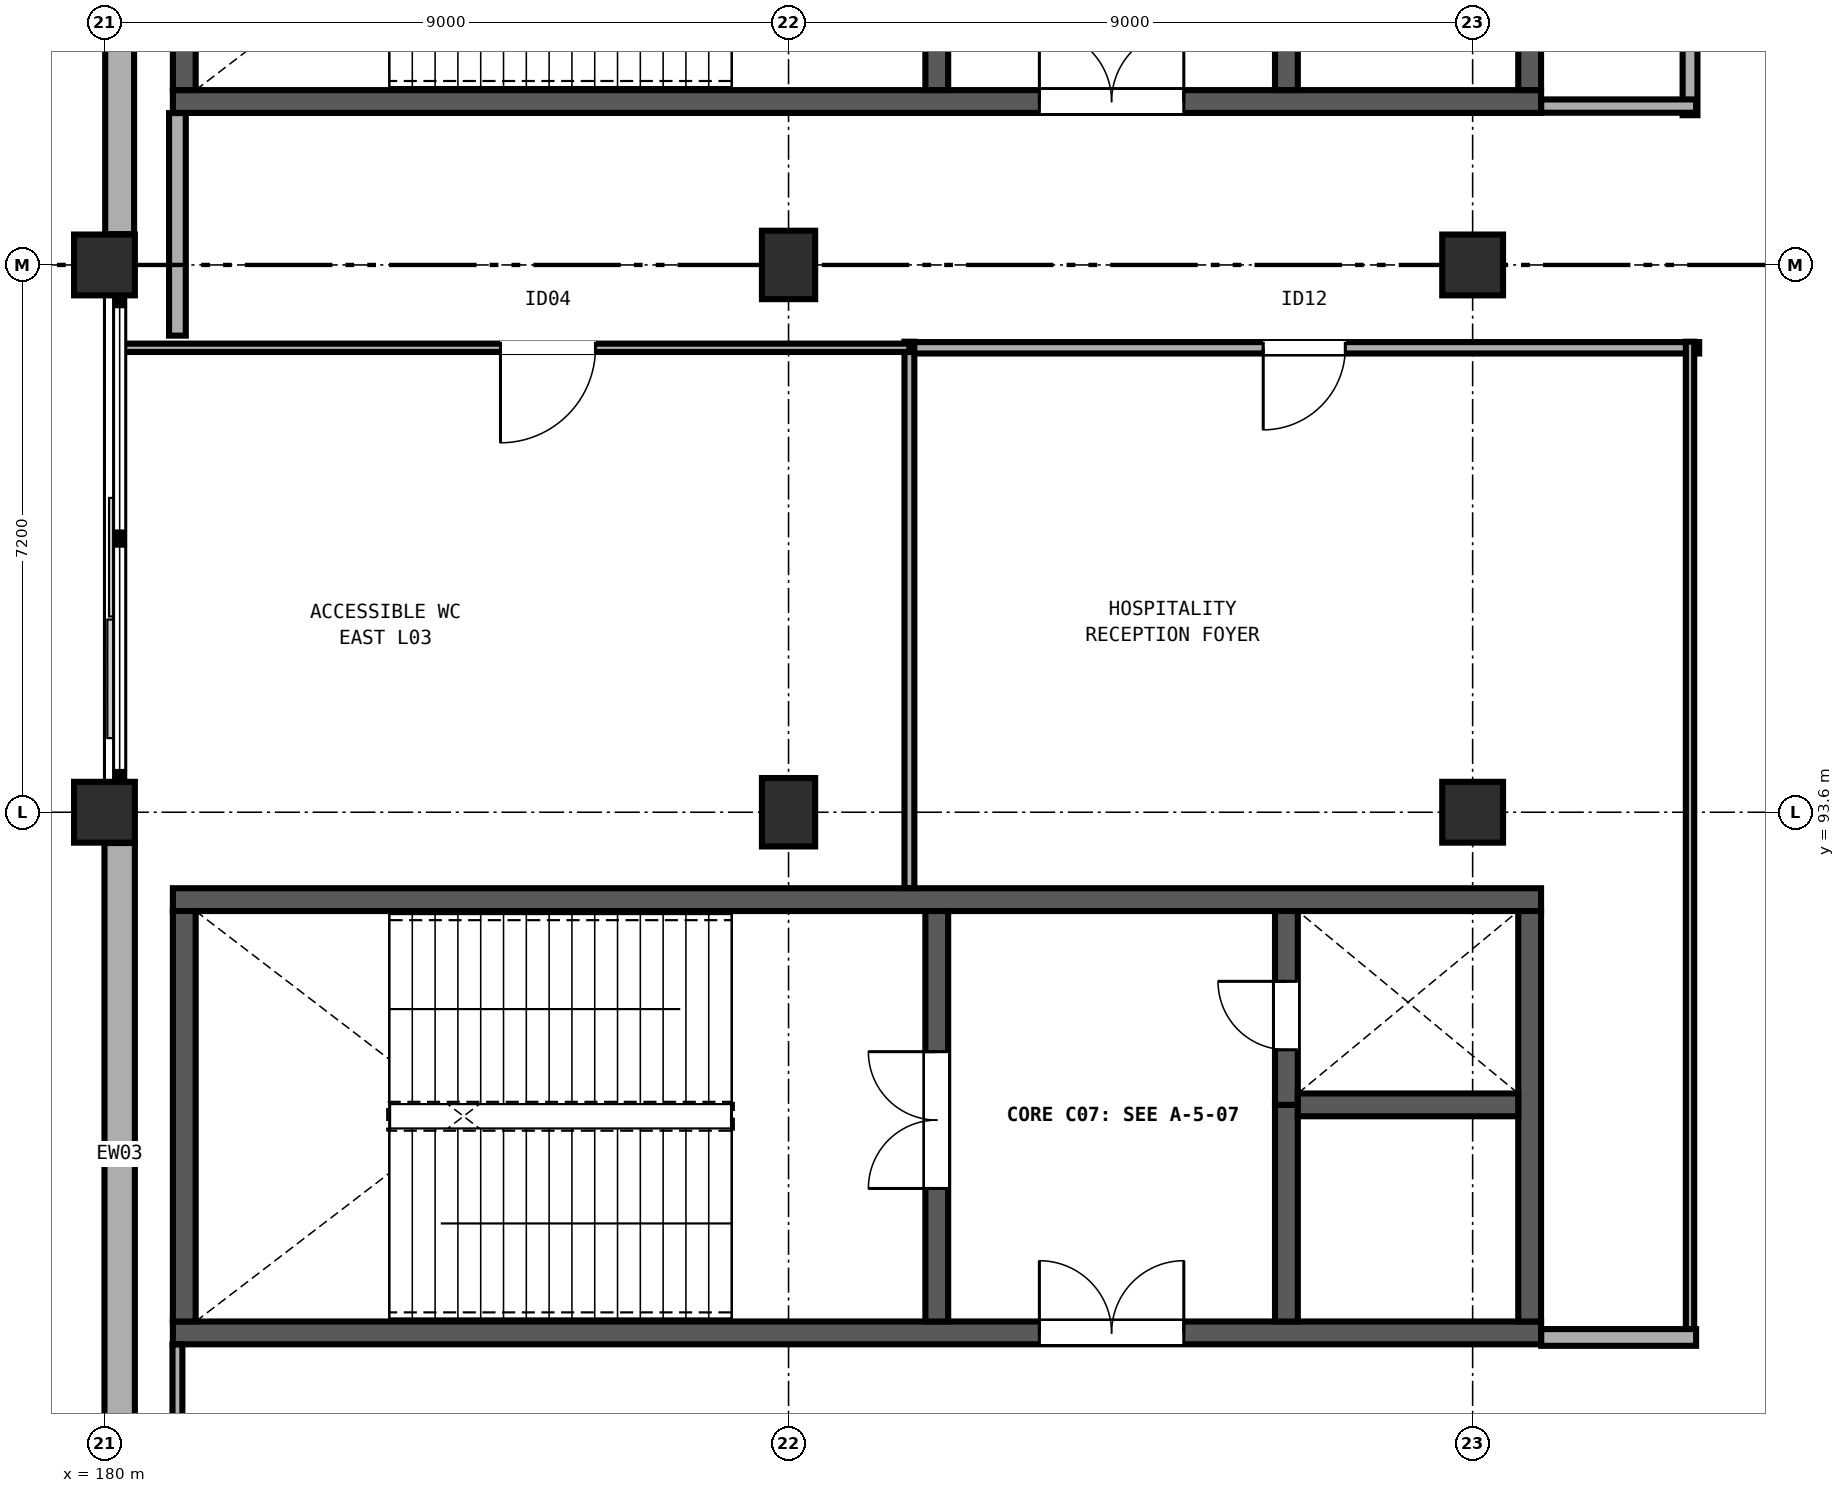
"""IFC4 building model, lengths in metres.
Left out: names, types, materials, properties, quantities, classifications, styles, units other than length and angle.
Written with IfcOpenShell. Run it as: python <this file> out.ifc"""

import sys

from ifc_helpers import new_model, si_unit, direction, frame, frame_2d, origin, origin_2d, place, context, subcontext, project, spatial, rectangle, extrude, element, fill, save


model = new_model("IFC4")
c1 = context("Model", 3, precision=1e-05, world=origin(), true_north=direction((0.0, 1.0)))
c2 = subcontext(c1, "Body", "Model", "MODEL_VIEW")
j1 = project(units=[si_unit("LENGTHUNIT", "METRE"), si_unit("PLANEANGLEUNIT", "RADIAN")], contexts=[c1])
p1 = place(None, origin())
s1 = spatial("IfcSite", under=j1, at=p1, CompositionType="ELEMENT")
p2 = place(p1, origin())
s2 = spatial("IfcBuilding", under=s1, at=p2, CompositionType="ELEMENT")
p3 = place(p2, frame((0.0, 0.0, 14.4)))
s3 = spatial("IfcBuildingStorey", under=s2, at=p3, CompositionType="ELEMENT", Elevation=14.4)
for number, where, z_axis, x_axis in (
    (1, (180.0, 93.6, 0.0), (0.0, 0.0, 1.0), (1.0, 0.0, 0.0)),
    (2, (180.0, 100.8, 0.0), (0.0, 0.0, 1.0), (1.0, 0.0, 0.0)),
):
    element("IfcColumn", number, at=place(p3, frame(where, z_axis=z_axis, x_axis=x_axis)), inside=s3, PredefinedType="COLUMN", context=c2, shape_type="SweptSolid", body=[
        extrude(rectangle(XDim=0.8, YDim=0.8, at=origin_2d()), origin(), (0.0, 0.0, 1.0), 4.8),
    ])
for number, where, z_axis, x_axis in (
    (3, (189.0, 93.6, 0.0), (0.0, 0.0, 1.0), (1.0, 0.0, 0.0)),
    (4, (189.0, 100.8, 0.0), (0.0, 0.0, 1.0), (1.0, 0.0, 0.0)),
):
    element("IfcColumn", number, at=place(p3, frame(where, z_axis=z_axis, x_axis=x_axis)), inside=s3, PredefinedType="COLUMN", context=c2, shape_type="SweptSolid", body=[
        extrude(rectangle(XDim=0.7, YDim=0.9, at=origin_2d()), origin(), (0.0, 0.0, 1.0), 4.8),
    ])
for number, where, z_axis, x_axis in (
    (5, (198.0, 93.6, 0.0), (0.0, 0.0, 1.0), (1.0, 0.0, 0.0)),
    (6, (198.0, 100.8, 0.0), (0.0, 0.0, 1.0), (1.0, 0.0, 0.0)),
):
    element("IfcColumn", number, at=place(p3, frame(where, z_axis=z_axis, x_axis=x_axis)), inside=s3, PredefinedType="COLUMN", context=c2, shape_type="SweptSolid", body=[
        extrude(rectangle(XDim=0.8, YDim=0.8, at=origin_2d()), origin(), (0.0, 0.0, 1.0), 4.8),
    ])
p4 = place(p3, frame((180.9, 86.75, 0.0), z_axis=(0.0, 0.0, 1.0), x_axis=(1.0, 0.0, 0.0)))
e7 = element("IfcWall", 7, at=p4, inside=s3, PredefinedType="SHEAR", context=c2, shape_type="SweptSolid", body=[
    extrude(rectangle(XDim=18.0, YDim=0.3, at=frame_2d((9.0, 0.0))), origin(), (0.0, 0.0, 1.0), 4.48),
])
p5 = place(p4, frame((11.4, 0.0, 0.0)))
e8 = element("IfcOpeningElement", 8, at=p5, cuts=e7, PredefinedType="OPENING", context=c2, shape_type="SweptSolid", body=[
    extrude(rectangle(XDim=1.9, YDim=2.25, at=frame_2d((0.95, 1.125))), frame((0.0, 0.16, 0.0), z_axis=(0.0, -1.0, 0.0), x_axis=(1.0, 0.0, 0.0)), (0.0, 0.0, 1.0), 0.32),
])
p6 = place(p3, frame((198.9, 92.45, 0.0), z_axis=(0.0, 0.0, 1.0), x_axis=(-1.0, 0.0, 0.0)))
e9 = element("IfcWall", 9, at=p6, inside=s3, PredefinedType="SHEAR", context=c2, shape_type="SweptSolid", body=[
    extrude(rectangle(XDim=18.0, YDim=0.3, at=frame_2d((9.0, 0.0))), origin(), (0.0, 0.0, 1.0), 4.48),
])
for number, where, z_axis, x_axis in (
    (10, (181.05, 92.3, 0.0), (0.0, 0.0, 1.0), (0.0, -1.0, 0.0)),
    (11, (198.75, 86.9, 0.0), (0.0, 0.0, 1.0), (0.0, 1.0, 0.0)),
):
    element("IfcWall", number, at=place(p3, frame(where, z_axis=z_axis, x_axis=x_axis)), inside=s3, PredefinedType="SHEAR", context=c2, shape_type="SweptSolid", body=[
        extrude(rectangle(XDim=5.4, YDim=0.3, at=frame_2d((2.7, 0.0))), origin(), (0.0, 0.0, 1.0), 4.48),
    ])
p7 = place(p3, frame((190.95, 86.9, 0.0), z_axis=(0.0, 0.0, 1.0), x_axis=(0.0, 1.0, 0.0)))
e12 = element("IfcWall", 12, at=p7, inside=s3, PredefinedType="SHEAR", context=c2, shape_type="SweptSolid", body=[
    extrude(rectangle(XDim=5.4, YDim=0.3, at=frame_2d((2.7, 0.0))), origin(), (0.0, 0.0, 1.0), 4.48),
])
p8 = place(p7, frame((1.75, 0.0, 0.0)))
e13 = element("IfcOpeningElement", 13, at=p8, cuts=e12, PredefinedType="OPENING", context=c2, shape_type="SweptSolid", body=[
    extrude(rectangle(XDim=1.8, YDim=2.25, at=frame_2d((0.9, 1.125))), frame((0.0, 0.16, 0.0), z_axis=(0.0, -1.0, 0.0), x_axis=(1.0, 0.0, 0.0)), (0.0, 0.0, 1.0), 0.32),
])
p9 = place(p3, frame((195.55, 86.9, 0.0), z_axis=(0.0, 0.0, 1.0), x_axis=(0.0, 1.0, 0.0)))
e14 = element("IfcWall", 14, at=p9, inside=s3, PredefinedType="SHEAR", context=c2, shape_type="SweptSolid", body=[
    extrude(rectangle(XDim=2.85, YDim=0.3, at=frame_2d((1.425, 0.0))), origin(), (0.0, 0.0, 1.0), 4.48),
])
p10 = place(p3, frame((195.55, 89.75, 0.0), z_axis=(0.0, 0.0, 1.0), x_axis=(0.0, 1.0, 0.0)))
e15 = element("IfcWall", 15, at=p10, inside=s3, PredefinedType="SHEAR", context=c2, shape_type="SweptSolid", body=[
    extrude(rectangle(XDim=2.55, YDim=0.3, at=frame_2d((1.275, 0.0))), origin(), (0.0, 0.0, 1.0), 4.48),
])
p11 = place(p10, frame((0.725, 0.0, 0.0)))
e16 = element("IfcOpeningElement", 16, at=p11, cuts=e15, PredefinedType="OPENING", context=c2, shape_type="SweptSolid", body=[
    extrude(rectangle(XDim=0.9, YDim=2.1, at=frame_2d((0.45, 1.05))), frame((0.0, 0.16, 0.0), z_axis=(0.0, -1.0, 0.0), x_axis=(1.0, 0.0, 0.0)), (0.0, 0.0, 1.0), 0.32),
])
p12 = place(p3, frame((195.7, 89.75, 0.0), z_axis=(0.0, 0.0, 1.0), x_axis=(1.0, 0.0, 0.0)))
e17 = element("IfcWall", 17, at=p12, inside=s3, PredefinedType="SHEAR", context=c2, shape_type="SweptSolid", body=[
    extrude(rectangle(XDim=2.9, YDim=0.3, at=frame_2d((1.45, 0.0))), origin(), (0.0, 0.0, 1.0), 4.48),
])
p13 = place(p3, frame((180.9, 102.95, 0.0), z_axis=(0.0, 0.0, 1.0), x_axis=(1.0, 0.0, 0.0)))
e18 = element("IfcWall", 18, at=p13, inside=s3, PredefinedType="SHEAR", context=c2, shape_type="SweptSolid", body=[
    extrude(rectangle(XDim=18.0, YDim=0.3, at=frame_2d((9.0, 0.0))), origin(), (0.0, 0.0, 1.0), 4.48),
])
p14 = place(p13, frame((11.4, 0.0, 0.0)))
e19 = element("IfcOpeningElement", 19, at=p14, cuts=e18, PredefinedType="OPENING", context=c2, shape_type="SweptSolid", body=[
    extrude(rectangle(XDim=1.9, YDim=2.25, at=frame_2d((0.95, 1.125))), frame((0.0, 0.16, 0.0), z_axis=(0.0, -1.0, 0.0), x_axis=(1.0, 0.0, 0.0)), (0.0, 0.0, 1.0), 0.32),
])
for number, where, z_axis, x_axis in (
    (20, (181.05, 108.5, 0.0), (0.0, 0.0, 1.0), (0.0, -1.0, 0.0)),
    (21, (198.75, 103.1, 0.0), (0.0, 0.0, 1.0), (0.0, 1.0, 0.0)),
):
    element("IfcWall", number, at=place(p3, frame(where, z_axis=z_axis, x_axis=x_axis)), inside=s3, PredefinedType="SHEAR", context=c2, shape_type="SweptSolid", body=[
        extrude(rectangle(XDim=5.4, YDim=0.3, at=frame_2d((2.7, 0.0))), origin(), (0.0, 0.0, 1.0), 4.48),
    ])
p15 = place(p3, frame((190.95, 103.1, 0.0), z_axis=(0.0, 0.0, 1.0), x_axis=(0.0, 1.0, 0.0)))
e22 = element("IfcWall", 22, at=p15, inside=s3, PredefinedType="SHEAR", context=c2, shape_type="SweptSolid", body=[
    extrude(rectangle(XDim=5.4, YDim=0.3, at=frame_2d((2.7, 0.0))), origin(), (0.0, 0.0, 1.0), 4.48),
])
p16 = place(p15, frame((1.75, 0.0, 0.0)))
e23 = element("IfcOpeningElement", 23, at=p16, cuts=e22, PredefinedType="OPENING", context=c2, shape_type="SweptSolid", body=[
    extrude(rectangle(XDim=1.8, YDim=2.25, at=frame_2d((0.9, 1.125))), frame((0.0, 0.16, 0.0), z_axis=(0.0, -1.0, 0.0), x_axis=(1.0, 0.0, 0.0)), (0.0, 0.0, 1.0), 0.32),
])
p17 = place(p3, frame((195.55, 103.1, 0.0), z_axis=(0.0, 0.0, 1.0), x_axis=(0.0, 1.0, 0.0)))
e24 = element("IfcWall", 24, at=p17, inside=s3, PredefinedType="SHEAR", context=c2, shape_type="SweptSolid", body=[
    extrude(rectangle(XDim=2.85, YDim=0.3, at=frame_2d((1.425, 0.0))), origin(), (0.0, 0.0, 1.0), 4.48),
])
p18 = place(p3, frame((180.2, 85.005, 0.0), z_axis=(0.0, 0.0, 1.0), x_axis=(0.0, 1.0, 0.0)))
e25 = element("IfcWall", 25, at=p18, inside=s3, PredefinedType="SOLIDWALL", context=c2, shape_type="SweptSolid", body=[
    extrude(rectangle(XDim=8.19, YDim=0.4, at=frame_2d((4.095, 0.0))), origin(), (0.0, 0.0, 1.0), 3.58),
])
p19 = place(p3, frame((180.2, 101.205, 0.0), z_axis=(0.0, 0.0, 1.0), x_axis=(0.0, 1.0, 0.0)))
e26 = element("IfcWall", 26, at=p19, inside=s3, PredefinedType="SOLIDWALL", context=c2, shape_type="SweptSolid", body=[
    extrude(rectangle(XDim=8.19, YDim=0.38, at=frame_2d((4.095, 0.0))), origin(), (0.0, 0.0, 1.0), 3.58),
])
p20 = place(p3, frame((200.86, 102.77, 0.0), z_axis=(0.0, 0.0, 1.0), x_axis=(0.0, 1.0, 0.0)))
e27 = element("IfcWall", 27, at=p20, inside=s3, PredefinedType="PARTITIONING", context=c2, shape_type="SweptSolid", body=[
    extrude(rectangle(XDim=11.39, YDim=0.195, at=frame_2d((5.695, 0.0))), origin(), (0.0, 0.0, 1.0), 3.56),
])
p21 = place(p20, frame((5.185, 0.0, 0.0)))
e28 = element("IfcOpeningElement", 28, at=p21, cuts=e27, PredefinedType="OPENING", context=c2, shape_type="SweptSolid", body=[
    extrude(rectangle(XDim=1.02, YDim=2.16, at=frame_2d((0.51, 1.08))), frame((0.0, 0.107, 0.0), z_axis=(0.0, -1.0, 0.0), x_axis=(1.0, 0.0, 0.0)), (0.0, 0.0, 1.0), 0.215),
])
p22 = place(p3, frame((200.94, 102.89, 0.0), z_axis=(0.0, 0.0, 1.0), x_axis=(-1.0, 0.0, 0.0)))
e29 = element("IfcWall", 29, at=p22, inside=s3, PredefinedType="PARTITIONING", context=c2, shape_type="SweptSolid", body=[
    extrude(rectangle(XDim=2.038, YDim=0.175, at=frame_2d((1.019, 0.0))), origin(), (0.0, 0.0, 1.0), 3.56),
])
p23 = place(p3, frame((200.98, 99.71, 0.0), z_axis=(0.0, 0.0, 1.0), x_axis=(-1.0, 0.0, 0.0)))
e30 = element("IfcWall", 30, at=p23, inside=s3, PredefinedType="PARTITIONING", context=c2, shape_type="SweptSolid", body=[
    extrude(rectangle(XDim=10.39, YDim=0.15, at=frame_2d((5.195, 0.0))), origin(), (0.0, 0.0, 1.0), 3.56),
])
p24 = place(p23, frame((4.655, 0.0, 0.0)))
e31 = element("IfcOpeningElement", 31, at=p24, cuts=e30, PredefinedType="OPENING", context=c2, shape_type="SweptSolid", body=[
    extrude(rectangle(XDim=1.08, YDim=2.18, at=frame_2d((0.54, 1.09))), frame((0.0, 0.085, 0.0), z_axis=(0.0, -1.0, 0.0), x_axis=(1.0, 0.0, 0.0)), (0.0, 0.0, 1.0), 0.17),
])
p25 = place(p3, frame((190.59, 92.602, 0.0), z_axis=(0.0, 0.0, 1.0), x_axis=(0.0, 1.0, 0.0)))
e32 = element("IfcWall", 32, at=p25, inside=s3, PredefinedType="PARTITIONING", context=c2, shape_type="SweptSolid", body=[
    extrude(rectangle(XDim=7.188, YDim=0.13, at=frame_2d((3.594, 0.0))), origin(), (0.0, 0.0, 1.0), 3.56),
])
p26 = place(p3, frame((200.86, 99.79, 0.0), z_axis=(0.0, 0.0, 1.0), x_axis=(0.0, -1.0, 0.0)))
e33 = element("IfcWall", 33, at=p26, inside=s3, PredefinedType="PARTITIONING", context=c2, shape_type="SweptSolid", body=[
    extrude(rectangle(XDim=13.18, YDim=0.11, at=frame_2d((6.59, 0.0))), origin(), (0.0, 0.0, 1.0), 3.56),
])
p27 = place(p3, frame((200.94, 86.69, 0.0), z_axis=(0.0, 0.0, 1.0), x_axis=(-1.0, 0.0, 0.0)))
e34 = element("IfcWall", 34, at=p27, inside=s3, PredefinedType="PARTITIONING", context=c2, shape_type="SweptSolid", body=[
    extrude(rectangle(XDim=2.038, YDim=0.22, at=frame_2d((1.019, 0.0))), origin(), (0.0, 0.0, 1.0), 3.56),
])
p28 = place(p3, frame((190.59, 99.71, 0.0), z_axis=(0.0, 0.0, 1.0), x_axis=(-1.0, 0.0, 0.0)))
e35 = element("IfcWall", 35, at=p28, inside=s3, PredefinedType="PARTITIONING", context=c2, shape_type="SweptSolid", body=[
    extrude(rectangle(XDim=10.357, YDim=0.11, at=frame_2d((5.179, 0.0))), origin(), (0.0, 0.0, 1.0), 3.56),
])
p29 = place(p28, frame((4.13, 0.0, 0.0)))
e36 = element("IfcOpeningElement", 36, at=p29, cuts=e35, PredefinedType="OPENING", context=c2, shape_type="SweptSolid", body=[
    extrude(rectangle(XDim=1.25, YDim=2.15, at=frame_2d((0.625, 1.075))), frame((0.0, 0.065, 0.0), z_axis=(0.0, -1.0, 0.0), x_axis=(1.0, 0.0, 0.0)), (0.0, 0.0, 1.0), 0.13),
])
p30 = place(p3, frame((180.96, 102.798, 0.0), z_axis=(0.0, 0.0, 1.0), x_axis=(0.0, -1.0, 0.0)))
e37 = element("IfcWall", 37, at=p30, inside=s3, PredefinedType="PARTITIONING", context=c2, shape_type="SweptSolid", body=[
    extrude(rectangle(XDim=2.928, YDim=0.22, at=frame_2d((1.464, 0.0))), origin(), (0.0, 0.0, 1.0), 3.56),
])
p31 = place(p3, frame((180.96, 86.598, 0.0), z_axis=(0.0, 0.0, 1.0), x_axis=(0.0, -1.0, 0.0)))
e38 = element("IfcWall", 38, at=p31, inside=s3, PredefinedType="PARTITIONING", context=c2, shape_type="SweptSolid", body=[
    extrude(rectangle(XDim=2.928, YDim=0.13, at=frame_2d((1.464, 0.0))), origin(), (0.0, 0.0, 1.0), 3.56),
])
p32 = place(p8, origin())
e39 = element("IfcDoor", 39, at=p32, inside=s3, OperationType="DOUBLE_DOOR_SINGLE_SWING", PredefinedType="DOOR", context=c2, shape_type="SweptSolid", body=[
    extrude(rectangle(XDim=1.8, YDim=2.25, at=frame_2d((0.9, 1.125))), frame((0.0, 0.025, 0.0), z_axis=(0.0, -1.0, 0.0), x_axis=(1.0, 0.0, 0.0)), (0.0, 0.0, 1.0), 0.05),
])
fill(e13, e39)
p33 = place(p11, origin())
e40 = element("IfcDoor", 40, at=p33, inside=s3, OperationType="SINGLE_SWING_RIGHT", PredefinedType="DOOR", context=c2, shape_type="SweptSolid", body=[
    extrude(rectangle(XDim=0.9, YDim=2.1, at=frame_2d((0.45, 1.05))), frame((0.0, 0.025, 0.0), z_axis=(0.0, -1.0, 0.0), x_axis=(1.0, 0.0, 0.0)), (0.0, 0.0, 1.0), 0.05),
])
fill(e16, e40)
p34 = place(p5, origin())
e41 = element("IfcDoor", 41, at=p34, inside=s3, OperationType="DOUBLE_DOOR_SINGLE_SWING", PredefinedType="DOOR", context=c2, shape_type="SweptSolid", body=[
    extrude(rectangle(XDim=1.9, YDim=2.25, at=frame_2d((0.95, 1.125))), frame((0.0, 0.025, 0.0), z_axis=(0.0, -1.0, 0.0), x_axis=(1.0, 0.0, 0.0)), (0.0, 0.0, 1.0), 0.05),
])
fill(e8, e41)
p35 = place(p14, origin())
e42 = element("IfcDoor", 42, at=p35, inside=s3, OperationType="DOUBLE_DOOR_SINGLE_SWING", PredefinedType="DOOR", context=c2, shape_type="SweptSolid", body=[
    extrude(rectangle(XDim=1.9, YDim=2.25, at=frame_2d((0.95, 1.125))), frame((0.0, 0.025, 0.0), z_axis=(0.0, -1.0, 0.0), x_axis=(1.0, 0.0, 0.0)), (0.0, 0.0, 1.0), 0.05),
])
fill(e19, e42)
p36 = place(p24, origin())
e43 = element("IfcDoor", 43, at=p36, inside=s3, OperationType="SINGLE_SWING_RIGHT", PredefinedType="DOOR", context=c2, shape_type="SweptSolid", body=[
    extrude(rectangle(XDim=1.08, YDim=2.18, at=frame_2d((0.54, 1.09))), frame((0.0, 0.025, 0.0), z_axis=(0.0, -1.0, 0.0), x_axis=(1.0, 0.0, 0.0)), (0.0, 0.0, 1.0), 0.05),
])
fill(e31, e43)
p37 = place(p29, origin())
e44 = element("IfcDoor", 44, at=p37, inside=s3, OperationType="SINGLE_SWING_RIGHT", PredefinedType="DOOR", context=c2, shape_type="SweptSolid", body=[
    extrude(rectangle(XDim=1.25, YDim=2.15, at=frame_2d((0.625, 1.075))), frame((0.0, 0.025, 0.0), z_axis=(0.0, -1.0, 0.0), x_axis=(1.0, 0.0, 0.0)), (0.0, 0.0, 1.0), 0.05),
])
fill(e36, e44)
save(model, sys.argv[1])
